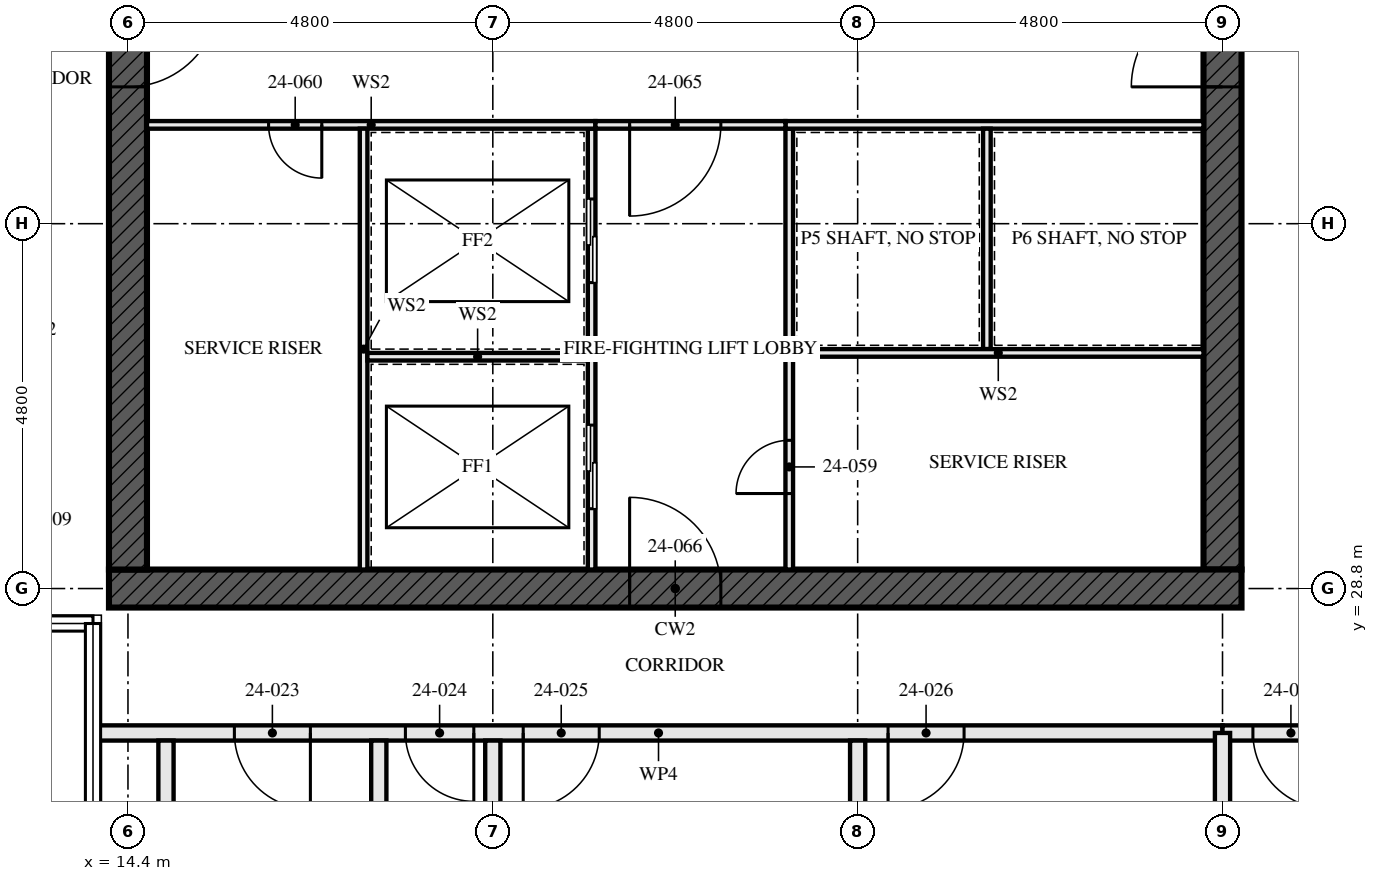
"""IFC4 building model, lengths in metres.
Left out: names, types, materials, properties, quantities, classifications, styles, units other than length and angle.
Written with IfcOpenShell. Run it as: python <this file> out.ifc"""

import sys

from ifc_helpers import new_model, si_unit, direction, frame, frame_2d, origin, place, context, subcontext, project, spatial, rectangle, extrude, element, fill, save


model = new_model("IFC4")
c1 = context("Model", 3, precision=1e-05, world=origin(), true_north=direction((0.0, 1.0)))
c2 = subcontext(c1, "Body", "Model", "MODEL_VIEW")
j1 = project(units=[si_unit("LENGTHUNIT", "METRE"), si_unit("PLANEANGLEUNIT", "RADIAN")], contexts=[c1])
p1 = place(None, origin())
s1 = spatial("IfcSite", under=j1, at=p1, CompositionType="ELEMENT")
p2 = place(p1, origin())
s2 = spatial("IfcBuilding", under=s1, at=p2, CompositionType="ELEMENT")
p3 = place(p2, frame((0.0, 0.0, 91.0)))
s3 = spatial("IfcBuildingStorey", under=s2, at=p3, CompositionType="ELEMENT", Elevation=91.0)
p4 = place(p3, frame((14.15, 28.8, -0.17), z_axis=(0.0, 0.0, 1.0), x_axis=(1.0, 0.0, 0.0)))
e1 = element("IfcWall", 1, at=p4, inside=s3, PredefinedType="SHEAR", context=c2, shape_type="SweptSolid", body=[
    extrude(rectangle(XDim=14.9, YDim=0.5, at=frame_2d((7.45, 0.0))), origin(), (0.0, 0.0, 1.0), 3.5),
])
p5 = place(p4, frame((6.85, 0.0, 0.17)))
e2 = element("IfcOpeningElement", 2, at=p5, cuts=e1, PredefinedType="OPENING", context=c2, shape_type="SweptSolid", body=[
    extrude(rectangle(XDim=1.2, YDim=2.1, at=frame_2d((0.6, 1.05))), frame((0.0, 0.26, 0.0), z_axis=(0.0, -1.0, 0.0), x_axis=(1.0, 0.0, 0.0)), (0.0, 0.0, 1.0), 0.521),
])
p6 = place(p3, frame((14.4, 42.95, -0.17), z_axis=(0.0, 0.0, 1.0), x_axis=(0.0, -1.0, 0.0)))
e3 = element("IfcWall", 3, at=p6, inside=s3, PredefinedType="SHEAR", context=c2, shape_type="SweptSolid", body=[
    extrude(rectangle(XDim=13.9, YDim=0.5, at=frame_2d((6.95, 0.0))), origin(), (0.0, 0.0, 1.0), 3.5),
])
p7 = place(p6, frame((6.35, 0.0, 0.17)))
e4 = element("IfcOpeningElement", 4, at=p7, cuts=e3, PredefinedType="OPENING", context=c2, shape_type="SweptSolid", body=[
    extrude(rectangle(XDim=1.2, YDim=2.1, at=frame_2d((0.6, 1.05))), frame((0.0, 0.26, 0.0), z_axis=(0.0, -1.0, 0.0), x_axis=(1.0, 0.0, 0.0)), (0.0, 0.0, 1.0), 0.521),
])
p8 = place(p3, frame((28.8, 29.05, -0.17), z_axis=(0.0, 0.0, 1.0), x_axis=(0.0, 1.0, 0.0)))
e5 = element("IfcWall", 5, at=p8, inside=s3, PredefinedType="SHEAR", context=c2, shape_type="SweptSolid", body=[
    extrude(rectangle(XDim=13.9, YDim=0.5, at=frame_2d((6.95, 0.0))), origin(), (0.0, 0.0, 1.0), 3.5),
])
p9 = place(p8, frame((6.35, 0.0, 0.17)))
e6 = element("IfcOpeningElement", 6, at=p9, cuts=e5, PredefinedType="OPENING", context=c2, shape_type="SweptSolid", body=[
    extrude(rectangle(XDim=1.2, YDim=2.1, at=frame_2d((0.6, 1.05))), frame((0.0, 0.26, 0.0), z_axis=(0.0, -1.0, 0.0), x_axis=(1.0, 0.0, 0.0)), (0.0, 0.0, 1.0), 0.521),
])
for number, where, z_axis, x_axis in (
    (7, (14.9, 22.1, 0.0), (0.0, 0.0, 1.0), (0.0, 1.0, 0.0)),
    (8, (17.7, 22.1, 0.0), (0.0, 0.0, 1.0), (0.0, 1.0, 0.0)),
):
    element("IfcWall", number, at=place(p3, frame(where, z_axis=z_axis, x_axis=x_axis)), inside=s3, PredefinedType="SOLIDWALL", context=c2, shape_type="SweptSolid", body=[
        extrude(rectangle(XDim=4.7, YDim=0.2, at=frame_2d((2.35, 0.0))), origin(), (0.0, 0.0, 1.0), 2.99),
    ])
p10 = place(p3, frame((19.2, 19.545, 0.0), z_axis=(0.0, 0.0, 1.0), x_axis=(0.0, 1.0, 0.0)))
e9 = element("IfcWall", 9, at=p10, inside=s3, PredefinedType="PARTITIONING", context=c2, shape_type="SweptSolid", body=[
    extrude(rectangle(XDim=7.255, YDim=0.2, at=frame_2d((3.627, 0.0))), origin(), (0.0, 0.0, 1.0), 2.55),
])
p11 = place(p3, frame((24.0, 14.745, 0.0), z_axis=(0.0, 0.0, 1.0), x_axis=(0.0, 1.0, 0.0)))
e10 = element("IfcWall", 10, at=p11, inside=s3, PredefinedType="PARTITIONING", context=c2, shape_type="SweptSolid", body=[
    extrude(rectangle(XDim=12.055, YDim=0.2, at=frame_2d((6.027, 0.0))), origin(), (0.0, 0.0, 1.0), 2.55),
])
p12 = place(p3, frame((13.96, 26.9, 0.0), z_axis=(0.0, 0.0, 1.0), x_axis=(1.0, 0.0, 0.0)))
e11 = element("IfcWall", 11, at=p12, inside=s3, PredefinedType="PARTITIONING", context=c2, shape_type="SweptSolid", body=[
    extrude(rectangle(XDim=14.84, YDim=0.2, at=frame_2d((7.42, 0.0))), origin(), (0.0, 0.0, 1.0), 2.32),
])
p13 = place(p12, frame((1.84, 0.0, 0.0)))
e12 = element("IfcOpeningElement", 12, at=p13, cuts=e11, PredefinedType="OPENING", context=c2, shape_type="SweptSolid", body=[
    extrude(rectangle(XDim=1.0, YDim=2.1, at=frame_2d((0.5, 1.05))), frame((0.0, 0.111, 0.0), z_axis=(0.0, -1.0, 0.0), x_axis=(1.0, 0.0, 0.0)), (0.0, 0.0, 1.0), 0.221),
])
p14 = place(p12, frame((4.09, 0.0, 0.0)))
e13 = element("IfcOpeningElement", 13, at=p14, cuts=e11, PredefinedType="OPENING", context=c2, shape_type="SweptSolid", body=[
    extrude(rectangle(XDim=0.9, YDim=2.1, at=frame_2d((0.45, 1.05))), frame((0.0, 0.111, 0.0), z_axis=(0.0, -1.0, 0.0), x_axis=(1.0, 0.0, 0.0)), (0.0, 0.0, 1.0), 0.221),
])
p15 = place(p12, frame((5.64, 0.0, 0.0)))
e14 = element("IfcOpeningElement", 14, at=p15, cuts=e11, PredefinedType="OPENING", context=c2, shape_type="SweptSolid", body=[
    extrude(rectangle(XDim=1.0, YDim=2.1, at=frame_2d((0.5, 1.05))), frame((0.0, 0.111, 0.0), z_axis=(0.0, -1.0, 0.0), x_axis=(1.0, 0.0, 0.0)), (0.0, 0.0, 1.0), 0.221),
])
p16 = place(p12, frame((10.44, 0.0, 0.0)))
e15 = element("IfcOpeningElement", 15, at=p16, cuts=e11, PredefinedType="OPENING", context=c2, shape_type="SweptSolid", body=[
    extrude(rectangle(XDim=1.0, YDim=2.1, at=frame_2d((0.5, 1.05))), frame((0.0, 0.111, 0.0), z_axis=(0.0, -1.0, 0.0), x_axis=(1.0, 0.0, 0.0)), (0.0, 0.0, 1.0), 0.221),
])
p17 = place(p3, frame((28.8, 26.9, 0.0), z_axis=(0.0, 0.0, 1.0), x_axis=(1.0, 0.0, 0.0)))
e16 = element("IfcWall", 16, at=p17, inside=s3, PredefinedType="PARTITIONING", context=c2, shape_type="SweptSolid", body=[
    extrude(rectangle(XDim=9.6, YDim=0.2, at=frame_2d((4.8, 0.0))), origin(), (0.0, 0.0, 1.0), 3.33),
])
p18 = place(p17, frame((0.4, 0.0, 0.0)))
e17 = element("IfcOpeningElement", 17, at=p18, cuts=e16, PredefinedType="OPENING", context=c2, shape_type="SweptSolid", body=[
    extrude(rectangle(XDim=1.0, YDim=2.1, at=frame_2d((0.5, 1.05))), frame((0.0, 0.111, 0.0), z_axis=(0.0, -1.0, 0.0), x_axis=(1.0, 0.0, 0.0)), (0.0, 0.0, 1.0), 0.221),
])
p19 = place(p17, frame((5.2, 0.0, 0.0)))
e18 = element("IfcOpeningElement", 18, at=p19, cuts=e16, PredefinedType="OPENING", context=c2, shape_type="SweptSolid", body=[
    extrude(rectangle(XDim=1.0, YDim=2.1, at=frame_2d((0.5, 1.05))), frame((0.0, 0.111, 0.0), z_axis=(0.0, -1.0, 0.0), x_axis=(1.0, 0.0, 0.0)), (0.0, 0.0, 1.0), 0.221),
])
p20 = place(p3, frame((20.5, 29.05, 0.0), z_axis=(0.0, 0.0, 1.0), x_axis=(0.0, 1.0, 0.0)))
e19 = element("IfcWall", 19, at=p20, inside=s3, PredefinedType="SOLIDWALL", context=c2, shape_type="SweptSolid", body=[
    extrude(rectangle(XDim=5.8, YDim=0.1, at=frame_2d((2.9, 0.0))), origin(), (0.0, 0.0, 1.0), 3.33),
])
p21 = place(p20, frame((0.8, 0.0, 0.0)))
e20 = element("IfcOpeningElement", 20, at=p21, cuts=e19, PredefinedType="OPENING", context=c2, shape_type="SweptSolid", body=[
    extrude(rectangle(XDim=1.1, YDim=2.3, at=frame_2d((0.55, 1.15))), frame((0.0, 0.061, 0.0), z_axis=(0.0, -1.0, 0.0), x_axis=(1.0, 0.0, 0.0)), (0.0, 0.0, 1.0), 0.121),
])
p22 = place(p20, frame((3.775, 0.0, 0.0)))
e21 = element("IfcOpeningElement", 21, at=p22, cuts=e19, PredefinedType="OPENING", context=c2, shape_type="SweptSolid", body=[
    extrude(rectangle(XDim=1.1, YDim=2.3, at=frame_2d((0.55, 1.15))), frame((0.0, 0.061, 0.0), z_axis=(0.0, -1.0, 0.0), x_axis=(1.0, 0.0, 0.0)), (0.0, 0.0, 1.0), 0.121),
])
p23 = place(p3, frame((23.1, 29.05, 0.0), z_axis=(0.0, 0.0, 1.0), x_axis=(0.0, 1.0, 0.0)))
e22 = element("IfcWall", 22, at=p23, inside=s3, PredefinedType="SOLIDWALL", context=c2, shape_type="SweptSolid", body=[
    extrude(rectangle(XDim=5.8, YDim=0.1, at=frame_2d((2.9, 0.0))), origin(), (0.0, 0.0, 1.0), 3.33),
])
p24 = place(p23, frame((1.0, 0.0, 0.0)))
e23 = element("IfcOpeningElement", 23, at=p24, cuts=e22, PredefinedType="OPENING", context=c2, shape_type="SweptSolid", body=[
    extrude(rectangle(XDim=0.7, YDim=2.1, at=frame_2d((0.35, 1.05))), frame((0.0, 0.061, 0.0), z_axis=(0.0, -1.0, 0.0), x_axis=(1.0, 0.0, 0.0)), (0.0, 0.0, 1.0), 0.121),
])
p25 = place(p3, frame((14.65, 34.9, 0.0), z_axis=(0.0, 0.0, 1.0), x_axis=(1.0, 0.0, 0.0)))
e24 = element("IfcWall", 24, at=p25, inside=s3, PredefinedType="SOLIDWALL", context=c2, shape_type="SweptSolid", body=[
    extrude(rectangle(XDim=5.9, YDim=0.1, at=frame_2d((2.95, 0.0))), origin(), (0.0, 0.0, 1.0), 3.33),
])
p26 = place(p25, frame((1.6, 0.0, 0.0)))
e25 = element("IfcOpeningElement", 25, at=p26, cuts=e24, PredefinedType="OPENING", context=c2, shape_type="SweptSolid", body=[
    extrude(rectangle(XDim=0.7, YDim=2.1, at=frame_2d((0.35, 1.05))), frame((0.0, 0.061, 0.0), z_axis=(0.0, -1.0, 0.0), x_axis=(1.0, 0.0, 0.0)), (0.0, 0.0, 1.0), 0.121),
])
p27 = place(p3, frame((23.05, 34.9, 0.0), z_axis=(0.0, 0.0, 1.0), x_axis=(1.0, 0.0, 0.0)))
e26 = element("IfcWall", 26, at=p27, inside=s3, PredefinedType="SOLIDWALL", context=c2, shape_type="SweptSolid", body=[
    extrude(rectangle(XDim=5.5, YDim=0.1, at=frame_2d((2.75, 0.0))), origin(), (0.0, 0.0, 1.0), 3.33),
])
p28 = place(p3, frame((20.55, 34.9, 0.0), z_axis=(0.0, 0.0, 1.0), x_axis=(1.0, 0.0, 0.0)))
e27 = element("IfcWall", 27, at=p28, inside=s3, PredefinedType="SOLIDWALL", context=c2, shape_type="SweptSolid", body=[
    extrude(rectangle(XDim=2.5, YDim=0.1, at=frame_2d((1.25, 0.0))), origin(), (0.0, 0.0, 1.0), 3.33),
])
p29 = place(p28, frame((0.45, 0.0, 0.0)))
e28 = element("IfcOpeningElement", 28, at=p29, cuts=e27, PredefinedType="OPENING", context=c2, shape_type="SweptSolid", body=[
    extrude(rectangle(XDim=1.2, YDim=2.1, at=frame_2d((0.6, 1.05))), frame((0.0, 0.061, 0.0), z_axis=(0.0, -1.0, 0.0), x_axis=(1.0, 0.0, 0.0)), (0.0, 0.0, 1.0), 0.121),
])
p30 = place(p3, frame((17.5, 29.05, 0.0), z_axis=(0.0, 0.0, 1.0), x_axis=(0.0, 1.0, 0.0)))
e29 = element("IfcWall", 29, at=p30, inside=s3, PredefinedType="SOLIDWALL", context=c2, shape_type="SweptSolid", body=[
    extrude(rectangle(XDim=5.8, YDim=0.1, at=frame_2d((2.9, 0.0))), origin(), (0.0, 0.0, 1.0), 3.33),
])
p31 = place(p3, frame((17.55, 31.85, 0.0), z_axis=(0.0, 0.0, 1.0), x_axis=(1.0, 0.0, 0.0)))
e30 = element("IfcWall", 30, at=p31, inside=s3, PredefinedType="SOLIDWALL", context=c2, shape_type="SweptSolid", body=[
    extrude(rectangle(XDim=2.9, YDim=0.1, at=frame_2d((1.45, 0.0))), origin(), (0.0, 0.0, 1.0), 3.33),
])
p32 = place(p3, frame((25.7, 31.95, 0.0), z_axis=(0.0, 0.0, 1.0), x_axis=(0.0, 1.0, 0.0)))
e31 = element("IfcWall", 31, at=p32, inside=s3, PredefinedType="SOLIDWALL", context=c2, shape_type="SweptSolid", body=[
    extrude(rectangle(XDim=2.9, YDim=0.1, at=frame_2d((1.45, 0.0))), origin(), (0.0, 0.0, 1.0), 3.33),
])
p33 = place(p3, frame((23.15, 31.9, 0.0), z_axis=(0.0, 0.0, 1.0), x_axis=(1.0, 0.0, 0.0)))
e32 = element("IfcWall", 32, at=p33, inside=s3, PredefinedType="SOLIDWALL", context=c2, shape_type="SweptSolid", body=[
    extrude(rectangle(XDim=5.4, YDim=0.1, at=frame_2d((2.7, 0.0))), origin(), (0.0, 0.0, 1.0), 3.33),
])
p34 = place(p3, frame((28.8, 24.37, 0.0), z_axis=(0.0, 0.0, 1.0), x_axis=(0.0, 1.0, 0.0)))
e33 = element("IfcWall", 33, at=p34, inside=s3, PredefinedType="PARTITIONING", context=c2, shape_type="SweptSolid", body=[
    extrude(rectangle(XDim=2.53, YDim=0.2, at=frame_2d((1.265, 0.0))), origin(), (0.0, 0.0, 1.0), 2.32),
])
p35 = place(p13, frame((1.0, 0.0, 0.0), z_axis=(0.0, 0.0, 1.0), x_axis=(-1.0, 0.0, 0.0)))
e34 = element("IfcDoor", 34, at=p35, inside=s3, OperationType="SINGLE_SWING_RIGHT", PredefinedType="DOOR", context=c2, shape_type="SweptSolid", body=[
    extrude(rectangle(XDim=1.0, YDim=2.1, at=frame_2d((0.5, 1.05))), frame((0.0, 0.032, 0.0), z_axis=(0.0, -1.0, 0.0), x_axis=(1.0, 0.0, 0.0)), (0.0, 0.0, 1.0), 0.064),
])
fill(e12, e34)
p36 = place(p14, frame((0.9, 0.0, 0.0), z_axis=(0.0, 0.0, 1.0), x_axis=(-1.0, 0.0, 0.0)))
e35 = element("IfcDoor", 35, at=p36, inside=s3, OperationType="SINGLE_SWING_RIGHT", PredefinedType="DOOR", context=c2, shape_type="SweptSolid", body=[
    extrude(rectangle(XDim=0.9, YDim=2.1, at=frame_2d((0.45, 1.05))), frame((0.0, 0.027, 0.0), z_axis=(0.0, -1.0, 0.0), x_axis=(1.0, 0.0, 0.0)), (0.0, 0.0, 1.0), 0.054),
])
fill(e13, e35)
p37 = place(p15, frame((1.0, 0.0, 0.0), z_axis=(0.0, 0.0, 1.0), x_axis=(-1.0, 0.0, 0.0)))
e36 = element("IfcDoor", 36, at=p37, inside=s3, OperationType="SINGLE_SWING_LEFT", PredefinedType="DOOR", context=c2, shape_type="SweptSolid", body=[
    extrude(rectangle(XDim=1.0, YDim=2.1, at=frame_2d((0.5, 1.05))), frame((0.0, 0.027, 0.0), z_axis=(0.0, -1.0, 0.0), x_axis=(1.0, 0.0, 0.0)), (0.0, 0.0, 1.0), 0.054),
])
fill(e14, e36)
p38 = place(p16, frame((1.0, 0.0, 0.0), z_axis=(0.0, 0.0, 1.0), x_axis=(-1.0, 0.0, 0.0)))
e37 = element("IfcDoor", 37, at=p38, inside=s3, OperationType="SINGLE_SWING_LEFT", PredefinedType="DOOR", context=c2, shape_type="SweptSolid", body=[
    extrude(rectangle(XDim=1.0, YDim=2.1, at=frame_2d((0.5, 1.05))), frame((0.0, 0.027, 0.0), z_axis=(0.0, -1.0, 0.0), x_axis=(1.0, 0.0, 0.0)), (0.0, 0.0, 1.0), 0.054),
])
fill(e15, e37)
p39 = place(p18, frame((1.0, 0.0, 0.0), z_axis=(0.0, 0.0, 1.0), x_axis=(-1.0, 0.0, 0.0)))
e38 = element("IfcDoor", 38, at=p39, inside=s3, OperationType="SINGLE_SWING_RIGHT", PredefinedType="DOOR", context=c2, shape_type="SweptSolid", body=[
    extrude(rectangle(XDim=1.0, YDim=2.1, at=frame_2d((0.5, 1.05))), frame((0.0, 0.027, 0.0), z_axis=(0.0, -1.0, 0.0), x_axis=(1.0, 0.0, 0.0)), (0.0, 0.0, 1.0), 0.054),
])
fill(e17, e38)
p40 = place(p21, origin())
e39 = element("IfcDoor", 39, at=p40, inside=s3, OperationType="SLIDING_TO_LEFT", PredefinedType="DOOR", context=c2, shape_type="SweptSolid", body=[
    extrude(rectangle(XDim=1.1, YDim=2.3, at=frame_2d((0.55, 1.15))), frame((0.0, 0.05, 0.0), z_axis=(0.0, -1.0, 0.0), x_axis=(1.0, 0.0, 0.0)), (0.0, 0.0, 1.0), 0.1),
])
fill(e20, e39)
p41 = place(p22, origin())
e40 = element("IfcDoor", 40, at=p41, inside=s3, OperationType="SLIDING_TO_LEFT", PredefinedType="DOOR", context=c2, shape_type="SweptSolid", body=[
    extrude(rectangle(XDim=1.1, YDim=2.3, at=frame_2d((0.55, 1.15))), frame((0.0, 0.05, 0.0), z_axis=(0.0, -1.0, 0.0), x_axis=(1.0, 0.0, 0.0)), (0.0, 0.0, 1.0), 0.1),
])
fill(e21, e40)
p42 = place(p24, origin())
e41 = element("IfcDoor", 41, at=p42, inside=s3, OperationType="SINGLE_SWING_RIGHT", PredefinedType="DOOR", context=c2, shape_type="SweptSolid", body=[
    extrude(rectangle(XDim=0.7, YDim=2.1, at=frame_2d((0.35, 1.05))), frame((0.0, 0.027, 0.0), z_axis=(0.0, -1.0, 0.0), x_axis=(1.0, 0.0, 0.0)), (0.0, 0.0, 1.0), 0.054),
])
fill(e23, e41)
p43 = place(p26, frame((0.7, 0.0, 0.0), z_axis=(0.0, 0.0, 1.0), x_axis=(-1.0, 0.0, 0.0)))
e42 = element("IfcDoor", 42, at=p43, inside=s3, OperationType="SINGLE_SWING_RIGHT", PredefinedType="DOOR", context=c2, shape_type="SweptSolid", body=[
    extrude(rectangle(XDim=0.7, YDim=2.1, at=frame_2d((0.35, 1.05))), frame((0.0, 0.027, 0.0), z_axis=(0.0, -1.0, 0.0), x_axis=(1.0, 0.0, 0.0)), (0.0, 0.0, 1.0), 0.054),
])
fill(e25, e42)
p44 = place(p29, frame((1.2, 0.0, 0.0), z_axis=(0.0, 0.0, 1.0), x_axis=(-1.0, 0.0, 0.0)))
e43 = element("IfcDoor", 43, at=p44, inside=s3, OperationType="SINGLE_SWING_LEFT", PredefinedType="DOOR", context=c2, shape_type="SweptSolid", body=[
    extrude(rectangle(XDim=1.2, YDim=2.1, at=frame_2d((0.6, 1.05))), frame((0.0, 0.027, 0.0), z_axis=(0.0, -1.0, 0.0), x_axis=(1.0, 0.0, 0.0)), (0.0, 0.0, 1.0), 0.054),
])
fill(e28, e43)
p45 = place(p5, origin())
e44 = element("IfcDoor", 44, at=p45, inside=s3, OperationType="SINGLE_SWING_LEFT", PredefinedType="DOOR", context=c2, shape_type="SweptSolid", body=[
    extrude(rectangle(XDim=1.2, YDim=2.1, at=frame_2d((0.6, 1.05))), frame((0.0, 0.027, 0.0), z_axis=(0.0, -1.0, 0.0), x_axis=(1.0, 0.0, 0.0)), (0.0, 0.0, 1.0), 0.054),
])
fill(e2, e44)
p46 = place(p7, origin())
e45 = element("IfcDoor", 45, at=p46, inside=s3, OperationType="SINGLE_SWING_LEFT", PredefinedType="DOOR", context=c2, shape_type="SweptSolid", body=[
    extrude(rectangle(XDim=1.2, YDim=2.1, at=frame_2d((0.6, 1.05))), frame((0.0, 0.027, 0.0), z_axis=(0.0, -1.0, 0.0), x_axis=(1.0, 0.0, 0.0)), (0.0, 0.0, 1.0), 0.054),
])
fill(e4, e45)
p47 = place(p9, origin())
e46 = element("IfcDoor", 46, at=p47, inside=s3, OperationType="SINGLE_SWING_LEFT", PredefinedType="DOOR", context=c2, shape_type="SweptSolid", body=[
    extrude(rectangle(XDim=1.2, YDim=2.1, at=frame_2d((0.6, 1.05))), frame((0.0, 0.027, 0.0), z_axis=(0.0, -1.0, 0.0), x_axis=(1.0, 0.0, 0.0)), (0.0, 0.0, 1.0), 0.054),
])
fill(e6, e46)
save(model, sys.argv[1])
